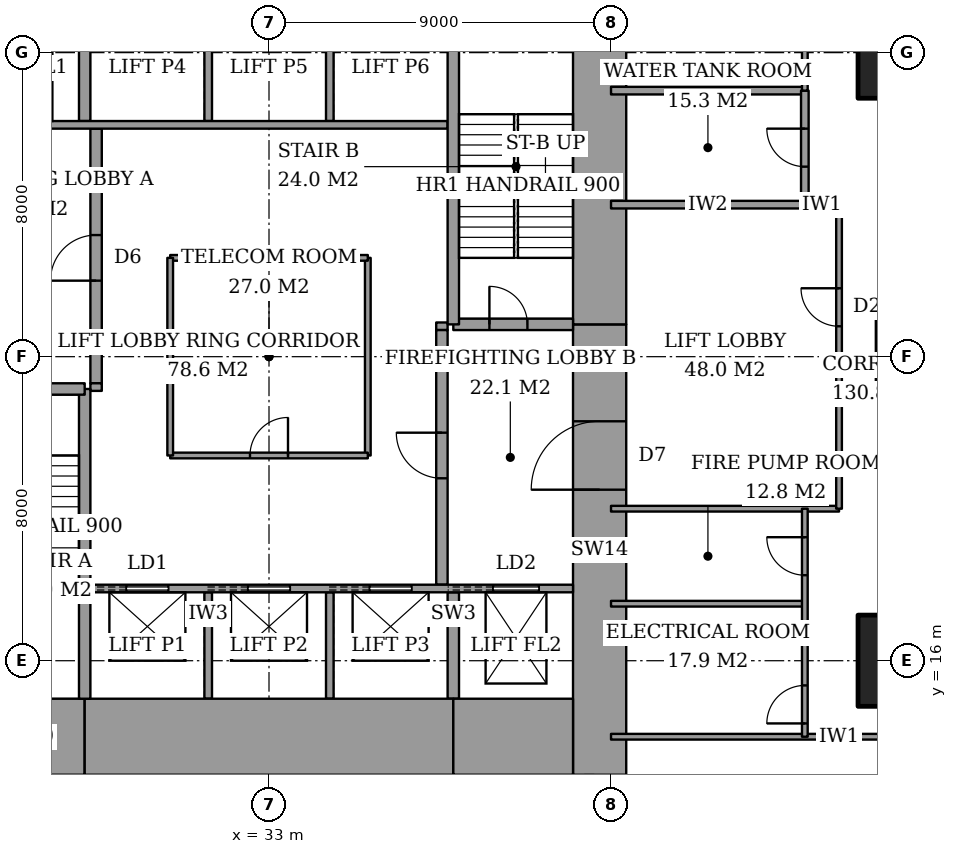
"""IFC4 building model, lengths in metres.
Left out: names, types, materials, properties, quantities, classifications, styles, units other than length and angle.
Written with IfcOpenShell. Run it as: python <this file> out.ifc"""

import sys

from ifc_helpers import new_model, si_unit, direction, frame, frame_2d, origin, origin_2d, place, context, subcontext, project, spatial, rectangle, extrude, element, fill, save


model = new_model("IFC4")
c1 = context("Model", 3, precision=1e-05, world=origin(), true_north=direction((0.0, 1.0)))
c2 = subcontext(c1, "Body", "Model", "MODEL_VIEW")
j1 = project(units=[si_unit("LENGTHUNIT", "METRE"), si_unit("PLANEANGLEUNIT", "RADIAN")], contexts=[c1])
p1 = place(None, origin())
s1 = spatial("IfcSite", under=j1, at=p1, CompositionType="ELEMENT")
p2 = place(p1, origin())
s2 = spatial("IfcBuilding", under=s1, at=p2, CompositionType="ELEMENT")
p3 = place(p2, frame((0.0, 0.0, 90.8)))
s3 = spatial("IfcBuildingStorey", under=s2, at=p3, CompositionType="ELEMENT", Elevation=90.8)
for number, where, z_axis, x_axis in (
    (1, (50.0, 16.0, 0.0), (0.0, 0.0, 1.0), (1.0, 0.0, 0.0)),
    (2, (50.0, 32.0, 0.0), (0.0, 0.0, 1.0), (1.0, 0.0, 0.0)),
):
    element("IfcColumn", number, at=place(p3, frame(where, z_axis=z_axis, x_axis=x_axis)), inside=s3, PredefinedType="COLUMN", context=c2, shape_type="SweptSolid", body=[
        extrude(rectangle(XDim=3.0, YDim=2.4, at=origin_2d()), origin(), (0.0, 0.0, 1.0), 5.4),
    ])
p4 = place(p3, frame((25.0, 14.0, 0.0), z_axis=(0.0, 0.0, 1.0), x_axis=(1.0, 0.0, 0.0)))
e3 = element("IfcWall", 3, at=p4, inside=s3, PredefinedType="SHEAR", context=c2, shape_type="SweptSolid", body=[
    extrude(rectangle(XDim=3.15, YDim=2.0, at=frame_2d((1.575, 0.0))), origin(), (0.0, 0.0, 1.0), 5.4),
])
p5 = place(p3, frame((28.15, 14.0, 0.0), z_axis=(0.0, 0.0, 1.0), x_axis=(1.0, 0.0, 0.0)))
e4 = element("IfcWall", 4, at=p5, inside=s3, PredefinedType="SHEAR", context=c2, shape_type="SweptSolid", body=[
    extrude(rectangle(XDim=9.7, YDim=2.0, at=frame_2d((4.85, 0.0))), origin(), (0.0, 0.0, 1.0), 5.4),
])
p6 = place(p3, frame((37.85, 14.0, 0.0), z_axis=(0.0, 0.0, 1.0), x_axis=(1.0, 0.0, 0.0)))
e5 = element("IfcWall", 5, at=p6, inside=s3, PredefinedType="SHEAR", context=c2, shape_type="SweptSolid", body=[
    extrude(rectangle(XDim=3.15, YDim=2.0, at=frame_2d((1.575, 0.0))), origin(), (0.0, 0.0, 1.0), 5.4),
])
p7 = place(p3, frame((41.7, 13.0, 0.0), z_axis=(0.0, 0.0, 1.0), x_axis=(0.0, 1.0, 0.0)))
e6 = element("IfcWall", 6, at=p7, inside=s3, PredefinedType="SHEAR", context=c2, shape_type="SweptSolid", body=[
    extrude(rectangle(XDim=11.85, YDim=1.4, at=frame_2d((5.925, 0.0))), origin(), (0.0, 0.0, 1.0), 5.4),
])
p8 = place(p7, frame((7.5, 0.0, 0.0)))
e7 = element("IfcOpeningElement", 7, at=p8, cuts=e6, PredefinedType="OPENING", context=c2, shape_type="SweptSolid", body=[
    extrude(rectangle(XDim=1.8, YDim=2.4, at=frame_2d((0.9, 1.2))), frame((0.0, 0.71, 0.0), z_axis=(0.0, -1.0, 0.0), x_axis=(1.0, 0.0, 0.0)), (0.0, 0.0, 1.0), 1.42),
])
p9 = place(p3, frame((41.7, 24.85, 0.0), z_axis=(0.0, 0.0, 1.0), x_axis=(0.0, 1.0, 0.0)))
e8 = element("IfcWall", 8, at=p9, inside=s3, PredefinedType="SHEAR", context=c2, shape_type="SweptSolid", body=[
    extrude(rectangle(XDim=10.15, YDim=1.4, at=frame_2d((5.075, 0.0))), origin(), (0.0, 0.0, 1.0), 5.4),
])
p10 = place(p3, frame((28.15, 15.0, 0.0), z_axis=(0.0, 0.0, 1.0), x_axis=(0.0, 1.0, 0.0)))
e9 = element("IfcWall", 9, at=p10, inside=s3, PredefinedType="SHEAR", context=c2, shape_type="SweptSolid", body=[
    extrude(rectangle(XDim=8.15, YDim=0.3, at=frame_2d((4.075, 0.0))), origin(), (0.0, 0.0, 1.0), 5.4),
])
p11 = place(p3, frame((25.0, 23.15, 0.0), z_axis=(0.0, 0.0, 1.0), x_axis=(1.0, 0.0, 0.0)))
e10 = element("IfcWall", 10, at=p11, inside=s3, PredefinedType="SHEAR", context=c2, shape_type="SweptSolid", body=[
    extrude(rectangle(XDim=3.15, YDim=0.3, at=frame_2d((1.575, 0.0))), origin(), (0.0, 0.0, 1.0), 5.4),
])
p12 = place(p11, frame((0.6, 0.0, 0.0)))
e11 = element("IfcOpeningElement", 11, at=p12, cuts=e10, PredefinedType="OPENING", context=c2, shape_type="SweptSolid", body=[
    extrude(rectangle(XDim=1.0, YDim=2.1, at=frame_2d((0.5, 1.05))), frame((0.0, 0.16, 0.0), z_axis=(0.0, -1.0, 0.0), x_axis=(1.0, 0.0, 0.0)), (0.0, 0.0, 1.0), 0.32),
])
p13 = place(p3, frame((37.85, 24.85, 0.0), z_axis=(0.0, 0.0, 1.0), x_axis=(0.0, 1.0, 0.0)))
e12 = element("IfcWall", 12, at=p13, inside=s3, PredefinedType="SHEAR", context=c2, shape_type="SweptSolid", body=[
    extrude(rectangle(XDim=8.15, YDim=0.3, at=frame_2d((4.075, 0.0))), origin(), (0.0, 0.0, 1.0), 5.4),
])
p14 = place(p3, frame((37.85, 24.85, 0.0), z_axis=(0.0, 0.0, 1.0), x_axis=(1.0, 0.0, 0.0)))
e13 = element("IfcWall", 13, at=p14, inside=s3, PredefinedType="SHEAR", context=c2, shape_type="SweptSolid", body=[
    extrude(rectangle(XDim=3.15, YDim=0.3, at=frame_2d((1.575, 0.0))), origin(), (0.0, 0.0, 1.0), 5.4),
])
p15 = place(p14, frame((0.95, 0.0, 0.0)))
e14 = element("IfcOpeningElement", 14, at=p15, cuts=e13, PredefinedType="OPENING", context=c2, shape_type="SweptSolid", body=[
    extrude(rectangle(XDim=1.0, YDim=2.1, at=frame_2d((0.5, 1.05))), frame((0.0, 0.16, 0.0), z_axis=(0.0, -1.0, 0.0), x_axis=(1.0, 0.0, 0.0)), (0.0, 0.0, 1.0), 0.32),
])
p16 = place(p3, frame((28.45, 23.3, 0.0), z_axis=(0.0, 0.0, 1.0), x_axis=(0.0, 1.0, 0.0)))
e15 = element("IfcWall", 15, at=p16, inside=s3, PredefinedType="PARTITIONING", context=c2, shape_type="SweptSolid", body=[
    extrude(rectangle(XDim=6.7, YDim=0.3, at=frame_2d((3.35, 0.0))), origin(), (0.0, 0.0, 1.0), 5.4),
])
p17 = place(p16, frame((2.7, 0.0, 0.0)))
e16 = element("IfcOpeningElement", 16, at=p17, cuts=e15, PredefinedType="OPENING", context=c2, shape_type="SweptSolid", body=[
    extrude(rectangle(XDim=1.2, YDim=2.1, at=frame_2d((0.6, 1.05))), frame((0.0, 0.16, 0.0), z_axis=(0.0, -1.0, 0.0), x_axis=(1.0, 0.0, 0.0)), (0.0, 0.0, 1.0), 0.32),
])
p18 = place(p3, frame((37.55, 18.0, 0.0), z_axis=(0.0, 0.0, 1.0), x_axis=(0.0, 1.0, 0.0)))
e17 = element("IfcWall", 17, at=p18, inside=s3, PredefinedType="PARTITIONING", context=c2, shape_type="SweptSolid", body=[
    extrude(rectangle(XDim=6.7, YDim=0.3, at=frame_2d((3.35, 0.0))), origin(), (0.0, 0.0, 1.0), 5.4),
])
p19 = place(p18, frame((2.8, 0.0, 0.0)))
e18 = element("IfcOpeningElement", 18, at=p19, cuts=e17, PredefinedType="OPENING", context=c2, shape_type="SweptSolid", body=[
    extrude(rectangle(XDim=1.2, YDim=2.1, at=frame_2d((0.6, 1.05))), frame((0.0, 0.16, 0.0), z_axis=(0.0, -1.0, 0.0), x_axis=(1.0, 0.0, 0.0)), (0.0, 0.0, 1.0), 0.32),
])
p20 = place(p3, frame((42.0, 14.0, 0.0), z_axis=(0.0, 0.0, 1.0), x_axis=(1.0, 0.0, 0.0)))
e19 = element("IfcWall", 19, at=p20, inside=s3, PredefinedType="PARTITIONING", context=c2, shape_type="SweptSolid", body=[
    extrude(rectangle(XDim=12.0, YDim=0.15, at=frame_2d((6.0, 0.0))), origin(), (0.0, 0.0, 1.0), 5.15),
])
p21 = place(p20, frame((9.55, 0.0, 0.0)))
e20 = element("IfcOpeningElement", 20, at=p21, cuts=e19, PredefinedType="OPENING", context=c2, shape_type="SweptSolid", body=[
    extrude(rectangle(XDim=1.0, YDim=2.1, at=frame_2d((0.5, 1.05))), frame((0.0, 0.085, 0.0), z_axis=(0.0, -1.0, 0.0), x_axis=(1.0, 0.0, 0.0)), (0.0, 0.0, 1.0), 0.17),
])
p22 = place(p3, frame((42.0, 17.5, 0.0), z_axis=(0.0, 0.0, 1.0), x_axis=(1.0, 0.0, 0.0)))
e21 = element("IfcWall", 21, at=p22, inside=s3, PredefinedType="PARTITIONING", context=c2, shape_type="SweptSolid", body=[
    extrude(rectangle(XDim=5.1, YDim=0.15, at=frame_2d((2.55, 0.0))), origin(), (0.0, 0.0, 1.0), 5.15),
])
p23 = place(p3, frame((42.0, 20.0, 0.0), z_axis=(0.0, 0.0, 1.0), x_axis=(1.0, 0.0, 0.0)))
e22 = element("IfcWall", 22, at=p23, inside=s3, PredefinedType="PARTITIONING", context=c2, shape_type="SweptSolid", body=[
    extrude(rectangle(XDim=6.0, YDim=0.15, at=frame_2d((3.0, 0.0))), origin(), (0.0, 0.0, 1.0), 5.15),
])
p24 = place(p3, frame((42.0, 28.0, 0.0), z_axis=(0.0, 0.0, 1.0), x_axis=(1.0, 0.0, 0.0)))
e23 = element("IfcWall", 23, at=p24, inside=s3, PredefinedType="PARTITIONING", context=c2, shape_type="SweptSolid", body=[
    extrude(rectangle(XDim=5.1, YDim=0.2, at=frame_2d((2.55, 0.0))), origin(), (0.0, 0.0, 1.0), 5.15),
])
p25 = place(p3, frame((47.1, 28.0, 0.0), z_axis=(0.0, 0.0, 1.0), x_axis=(1.0, 0.0, 0.0)))
e24 = element("IfcWall", 24, at=p25, inside=s3, PredefinedType="PARTITIONING", context=c2, shape_type="SweptSolid", body=[
    extrude(rectangle(XDim=0.9, YDim=0.15, at=frame_2d((0.45, 0.0))), origin(), (0.0, 0.0, 1.0), 5.15),
])
p26 = place(p3, frame((42.0, 31.0, 0.0), z_axis=(0.0, 0.0, 1.0), x_axis=(1.0, 0.0, 0.0)))
e25 = element("IfcWall", 25, at=p26, inside=s3, PredefinedType="PARTITIONING", context=c2, shape_type="SweptSolid", body=[
    extrude(rectangle(XDim=5.1, YDim=0.2, at=frame_2d((2.55, 0.0))), origin(), (0.0, 0.0, 1.0), 5.15),
])
p27 = place(p3, frame((47.1, 28.0, 0.0), z_axis=(0.0, 0.0, 1.0), x_axis=(0.0, 1.0, 0.0)))
e26 = element("IfcWall", 26, at=p27, inside=s3, PredefinedType="PARTITIONING", context=c2, shape_type="SweptSolid", body=[
    extrude(rectangle(XDim=3.0, YDim=0.2, at=frame_2d((1.5, 0.0))), origin(), (0.0, 0.0, 1.0), 5.15),
])
p28 = place(p27, frame((1.0, 0.0, 0.0)))
e27 = element("IfcOpeningElement", 27, at=p28, cuts=e26, PredefinedType="OPENING", context=c2, shape_type="SweptSolid", body=[
    extrude(rectangle(XDim=1.0, YDim=2.1, at=frame_2d((0.5, 1.05))), frame((0.0, 0.11, 0.0), z_axis=(0.0, -1.0, 0.0), x_axis=(1.0, 0.0, 0.0)), (0.0, 0.0, 1.0), 0.22),
])
p29 = place(p3, frame((47.1, 14.0, 0.0), z_axis=(0.0, 0.0, 1.0), x_axis=(0.0, 1.0, 0.0)))
e28 = element("IfcWall", 28, at=p29, inside=s3, PredefinedType="PARTITIONING", context=c2, shape_type="SweptSolid", body=[
    extrude(rectangle(XDim=6.0, YDim=0.15, at=frame_2d((3.0, 0.0))), origin(), (0.0, 0.0, 1.0), 5.15),
])
p30 = place(p29, frame((0.35, 0.0, 0.0)))
e29 = element("IfcOpeningElement", 29, at=p30, cuts=e28, PredefinedType="OPENING", context=c2, shape_type="SweptSolid", body=[
    extrude(rectangle(XDim=1.0, YDim=2.1, at=frame_2d((0.5, 1.05))), frame((0.0, 0.085, 0.0), z_axis=(0.0, -1.0, 0.0), x_axis=(1.0, 0.0, 0.0)), (0.0, 0.0, 1.0), 0.17),
])
p31 = place(p29, frame((4.25, 0.0, 0.0)))
e30 = element("IfcOpeningElement", 30, at=p31, cuts=e28, PredefinedType="OPENING", context=c2, shape_type="SweptSolid", body=[
    extrude(rectangle(XDim=1.0, YDim=2.1, at=frame_2d((0.5, 1.05))), frame((0.0, 0.085, 0.0), z_axis=(0.0, -1.0, 0.0), x_axis=(1.0, 0.0, 0.0)), (0.0, 0.0, 1.0), 0.17),
])
p32 = place(p3, frame((47.1, 31.0, 0.0), z_axis=(0.0, 0.0, 1.0), x_axis=(0.0, 1.0, 0.0)))
e31 = element("IfcWall", 31, at=p32, inside=s3, PredefinedType="PARTITIONING", context=c2, shape_type="SweptSolid", body=[
    extrude(rectangle(XDim=3.0, YDim=0.15, at=frame_2d((1.5, 0.0))), origin(), (0.0, 0.0, 1.0), 5.15),
])
p33 = place(p32, frame((1.7, 0.0, 0.0)))
e32 = element("IfcOpeningElement", 32, at=p33, cuts=e31, PredefinedType="OPENING", context=c2, shape_type="SweptSolid", body=[
    extrude(rectangle(XDim=1.0, YDim=2.1, at=frame_2d((0.5, 1.05))), frame((0.0, 0.085, 0.0), z_axis=(0.0, -1.0, 0.0), x_axis=(1.0, 0.0, 0.0)), (0.0, 0.0, 1.0), 0.17),
])
p34 = place(p3, frame((48.0, 20.0, 0.0), z_axis=(0.0, 0.0, 1.0), x_axis=(0.0, 1.0, 0.0)))
e33 = element("IfcWall", 33, at=p34, inside=s3, PredefinedType="PARTITIONING", context=c2, shape_type="SweptSolid", body=[
    extrude(rectangle(XDim=8.0, YDim=0.15, at=frame_2d((4.0, 0.0))), origin(), (0.0, 0.0, 1.0), 5.15),
])
p35 = place(p34, frame((4.8, 0.0, 0.0)))
e34 = element("IfcOpeningElement", 34, at=p35, cuts=e33, PredefinedType="OPENING", context=c2, shape_type="SweptSolid", body=[
    extrude(rectangle(XDim=1.0, YDim=2.1, at=frame_2d((0.5, 1.05))), frame((0.0, 0.085, 0.0), z_axis=(0.0, -1.0, 0.0), x_axis=(1.0, 0.0, 0.0)), (0.0, 0.0, 1.0), 0.17),
])
p36 = place(p3, frame((28.3, 17.9, 0.0), z_axis=(0.0, 0.0, 1.0), x_axis=(1.0, 0.0, 0.0)))
e35 = element("IfcWall", 35, at=p36, inside=s3, PredefinedType="PARTITIONING", context=c2, shape_type="SweptSolid", body=[
    extrude(rectangle(XDim=12.7, YDim=0.2, at=frame_2d((6.35, 0.0))), origin(), (0.0, 0.0, 1.0), 5.4),
])
p37 = place(p36, frame((0.95, 0.0, 0.0)))
e36 = element("IfcOpeningElement", 36, at=p37, cuts=e35, PredefinedType="OPENING", context=c2, shape_type="SweptSolid", body=[
    extrude(rectangle(XDim=1.1, YDim=2.1, at=frame_2d((0.55, 1.05))), frame((0.0, 0.11, 0.0), z_axis=(0.0, -1.0, 0.0), x_axis=(1.0, 0.0, 0.0)), (0.0, 0.0, 1.0), 0.22),
])
p38 = place(p36, frame((4.15, 0.0, 0.0)))
e37 = element("IfcOpeningElement", 37, at=p38, cuts=e35, PredefinedType="OPENING", context=c2, shape_type="SweptSolid", body=[
    extrude(rectangle(XDim=1.1, YDim=2.1, at=frame_2d((0.55, 1.05))), frame((0.0, 0.11, 0.0), z_axis=(0.0, -1.0, 0.0), x_axis=(1.0, 0.0, 0.0)), (0.0, 0.0, 1.0), 0.22),
])
p39 = place(p36, frame((7.35, 0.0, 0.0)))
e38 = element("IfcOpeningElement", 38, at=p39, cuts=e35, PredefinedType="OPENING", context=c2, shape_type="SweptSolid", body=[
    extrude(rectangle(XDim=1.1, YDim=2.1, at=frame_2d((0.55, 1.05))), frame((0.0, 0.11, 0.0), z_axis=(0.0, -1.0, 0.0), x_axis=(1.0, 0.0, 0.0)), (0.0, 0.0, 1.0), 0.22),
])
p40 = place(p36, frame((10.6, 0.0, 0.0)))
e39 = element("IfcOpeningElement", 39, at=p40, cuts=e35, PredefinedType="OPENING", context=c2, shape_type="SweptSolid", body=[
    extrude(rectangle(XDim=1.2, YDim=2.1, at=frame_2d((0.6, 1.05))), frame((0.0, 0.11, 0.0), z_axis=(0.0, -1.0, 0.0), x_axis=(1.0, 0.0, 0.0)), (0.0, 0.0, 1.0), 0.22),
])
p41 = place(p3, frame((25.0, 30.1, 0.0), z_axis=(0.0, 0.0, 1.0), x_axis=(1.0, 0.0, 0.0)))
e40 = element("IfcWall", 40, at=p41, inside=s3, PredefinedType="PARTITIONING", context=c2, shape_type="SweptSolid", body=[
    extrude(rectangle(XDim=12.7, YDim=0.2, at=frame_2d((6.35, 0.0))), origin(), (0.0, 0.0, 1.0), 5.4),
])
p42 = place(p41, frame((0.9, 0.0, 0.0)))
e41 = element("IfcOpeningElement", 41, at=p42, cuts=e40, PredefinedType="OPENING", context=c2, shape_type="SweptSolid", body=[
    extrude(rectangle(XDim=1.2, YDim=2.1, at=frame_2d((0.6, 1.05))), frame((0.0, 0.11, 0.0), z_axis=(0.0, -1.0, 0.0), x_axis=(1.0, 0.0, 0.0)), (0.0, 0.0, 1.0), 0.22),
])
for number, where, z_axis, x_axis in (
    (42, (31.4, 15.0, 0.0), (0.0, 0.0, 1.0), (0.0, 1.0, 0.0)),
    (43, (34.6, 15.0, 0.0), (0.0, 0.0, 1.0), (0.0, 1.0, 0.0)),
):
    element("IfcWall", number, at=place(p3, frame(where, z_axis=z_axis, x_axis=x_axis)), inside=s3, PredefinedType="PARTITIONING", context=c2, shape_type="SweptSolid", body=[
        extrude(rectangle(XDim=2.8, YDim=0.2, at=frame_2d((1.4, 0.0))), origin(), (0.0, 0.0, 1.0), 5.4),
    ])
p43 = place(p3, frame((37.85, 15.0, 0.0), z_axis=(0.0, 0.0, 1.0), x_axis=(0.0, 1.0, 0.0)))
e44 = element("IfcWall", 44, at=p43, inside=s3, PredefinedType="SHEAR", context=c2, shape_type="SweptSolid", body=[
    extrude(rectangle(XDim=2.8, YDim=0.3, at=frame_2d((1.4, 0.0))), origin(), (0.0, 0.0, 1.0), 5.4),
])
for number, where, z_axis, x_axis in (
    (45, (31.4, 30.2, 0.0), (0.0, 0.0, 1.0), (0.0, 1.0, 0.0)),
    (46, (34.6, 30.2, 0.0), (0.0, 0.0, 1.0), (0.0, 1.0, 0.0)),
):
    element("IfcWall", number, at=place(p3, frame(where, z_axis=z_axis, x_axis=x_axis)), inside=s3, PredefinedType="PARTITIONING", context=c2, shape_type="SweptSolid", body=[
        extrude(rectangle(XDim=2.8, YDim=0.2, at=frame_2d((1.4, 0.0))), origin(), (0.0, 0.0, 1.0), 5.4),
    ])
p44 = place(p3, frame((28.15, 30.2, 0.0), z_axis=(0.0, 0.0, 1.0), x_axis=(0.0, 1.0, 0.0)))
e47 = element("IfcWall", 47, at=p44, inside=s3, PredefinedType="SHEAR", context=c2, shape_type="SweptSolid", body=[
    extrude(rectangle(XDim=2.8, YDim=0.3, at=frame_2d((1.4, 0.0))), origin(), (0.0, 0.0, 1.0), 5.4),
])
for number, where, z_axis, x_axis in (
    (48, (28.3, 23.2, 0.0), (0.0, 0.0, 1.0), (1.0, 0.0, 0.0)),
    (49, (37.4, 24.8, 0.0), (0.0, 0.0, 1.0), (1.0, 0.0, 0.0)),
):
    element("IfcWall", number, at=place(p3, frame(where, z_axis=z_axis, x_axis=x_axis)), inside=s3, PredefinedType="PARTITIONING", context=c2, shape_type="SweptSolid", body=[
        extrude(rectangle(XDim=0.3, YDim=0.2, at=frame_2d((0.15, 0.0))), origin(), (0.0, 0.0, 1.0), 5.4),
    ])
p45 = place(p3, frame((30.4, 21.4, 0.0), z_axis=(0.0, 0.0, 1.0), x_axis=(1.0, 0.0, 0.0)))
e50 = element("IfcWall", 50, at=p45, inside=s3, PredefinedType="PARTITIONING", context=c2, shape_type="SweptSolid", body=[
    extrude(rectangle(XDim=5.2, YDim=0.15, at=frame_2d((2.6, 0.0))), origin(), (0.0, 0.0, 1.0), 5.15),
])
p46 = place(p45, frame((2.1, 0.0, 0.0)))
e51 = element("IfcOpeningElement", 51, at=p46, cuts=e50, PredefinedType="OPENING", context=c2, shape_type="SweptSolid", body=[
    extrude(rectangle(XDim=1.0, YDim=2.1, at=frame_2d((0.5, 1.05))), frame((0.0, 0.085, 0.0), z_axis=(0.0, -1.0, 0.0), x_axis=(1.0, 0.0, 0.0)), (0.0, 0.0, 1.0), 0.17),
])
for number, where, z_axis, x_axis in (
    (52, (30.4, 26.6, 0.0), (0.0, 0.0, 1.0), (1.0, 0.0, 0.0)),
    (53, (30.4, 21.4, 0.0), (0.0, 0.0, 1.0), (0.0, 1.0, 0.0)),
    (54, (35.6, 21.4, 0.0), (0.0, 0.0, 1.0), (0.0, 1.0, 0.0)),
):
    element("IfcWall", number, at=place(p3, frame(where, z_axis=z_axis, x_axis=x_axis)), inside=s3, PredefinedType="PARTITIONING", context=c2, shape_type="SweptSolid", body=[
        extrude(rectangle(XDim=5.2, YDim=0.15, at=frame_2d((2.6, 0.0))), origin(), (0.0, 0.0, 1.0), 5.15),
    ])
p47 = place(p35, origin())
e55 = element("IfcDoor", 55, at=p47, inside=s3, OperationType="SINGLE_SWING_LEFT", PredefinedType="DOOR", context=c2, shape_type="SweptSolid", body=[
    extrude(rectangle(XDim=1.0, YDim=2.1, at=frame_2d((0.5, 1.05))), frame((0.0, 0.025, 0.0), z_axis=(0.0, -1.0, 0.0), x_axis=(1.0, 0.0, 0.0)), (0.0, 0.0, 1.0), 0.05),
])
fill(e34, e55)
p48 = place(p30, origin())
e56 = element("IfcDoor", 56, at=p48, inside=s3, OperationType="SINGLE_SWING_RIGHT", PredefinedType="DOOR", context=c2, shape_type="SweptSolid", body=[
    extrude(rectangle(XDim=1.0, YDim=2.1, at=frame_2d((0.5, 1.05))), frame((0.0, 0.025, 0.0), z_axis=(0.0, -1.0, 0.0), x_axis=(1.0, 0.0, 0.0)), (0.0, 0.0, 1.0), 0.05),
])
fill(e29, e56)
p49 = place(p31, origin())
e57 = element("IfcDoor", 57, at=p49, inside=s3, OperationType="SINGLE_SWING_LEFT", PredefinedType="DOOR", context=c2, shape_type="SweptSolid", body=[
    extrude(rectangle(XDim=1.0, YDim=2.1, at=frame_2d((0.5, 1.05))), frame((0.0, 0.025, 0.0), z_axis=(0.0, -1.0, 0.0), x_axis=(1.0, 0.0, 0.0)), (0.0, 0.0, 1.0), 0.05),
])
fill(e30, e57)
p50 = place(p28, origin())
e58 = element("IfcDoor", 58, at=p50, inside=s3, OperationType="SINGLE_SWING_LEFT", PredefinedType="DOOR", context=c2, shape_type="SweptSolid", body=[
    extrude(rectangle(XDim=1.0, YDim=2.1, at=frame_2d((0.5, 1.05))), frame((0.0, 0.025, 0.0), z_axis=(0.0, -1.0, 0.0), x_axis=(1.0, 0.0, 0.0)), (0.0, 0.0, 1.0), 0.05),
])
fill(e27, e58)
p51 = place(p15, origin())
e59 = element("IfcDoor", 59, at=p51, inside=s3, OperationType="SINGLE_SWING_RIGHT", PredefinedType="DOOR", context=c2, shape_type="SweptSolid", body=[
    extrude(rectangle(XDim=1.0, YDim=2.1, at=frame_2d((0.5, 1.05))), frame((0.0, 0.025, 0.0), z_axis=(0.0, -1.0, 0.0), x_axis=(1.0, 0.0, 0.0)), (0.0, 0.0, 1.0), 0.05),
])
fill(e14, e59)
p52 = place(p17, origin())
e60 = element("IfcDoor", 60, at=p52, inside=s3, OperationType="SINGLE_SWING_RIGHT", PredefinedType="DOOR", context=c2, shape_type="SweptSolid", body=[
    extrude(rectangle(XDim=1.2, YDim=2.1, at=frame_2d((0.6, 1.05))), frame((0.0, 0.025, 0.0), z_axis=(0.0, -1.0, 0.0), x_axis=(1.0, 0.0, 0.0)), (0.0, 0.0, 1.0), 0.05),
])
fill(e16, e60)
p53 = place(p19, origin())
e61 = element("IfcDoor", 61, at=p53, inside=s3, OperationType="SINGLE_SWING_LEFT", PredefinedType="DOOR", context=c2, shape_type="SweptSolid", body=[
    extrude(rectangle(XDim=1.2, YDim=2.1, at=frame_2d((0.6, 1.05))), frame((0.0, 0.025, 0.0), z_axis=(0.0, -1.0, 0.0), x_axis=(1.0, 0.0, 0.0)), (0.0, 0.0, 1.0), 0.05),
])
fill(e18, e61)
p54 = place(p8, origin())
e62 = element("IfcDoor", 62, at=p54, inside=s3, OperationType="DOUBLE_DOOR_DOUBLE_SWING", PredefinedType="DOOR", context=c2, shape_type="SweptSolid", body=[
    extrude(rectangle(XDim=1.8, YDim=2.4, at=frame_2d((0.9, 1.2))), frame((0.0, 0.025, 0.0), z_axis=(0.0, -1.0, 0.0), x_axis=(1.0, 0.0, 0.0)), (0.0, 0.0, 1.0), 0.05),
])
fill(e7, e62)
p55 = place(p46, origin())
e63 = element("IfcDoor", 63, at=p55, inside=s3, OperationType="SINGLE_SWING_LEFT", PredefinedType="DOOR", context=c2, shape_type="SweptSolid", body=[
    extrude(rectangle(XDim=1.0, YDim=2.1, at=frame_2d((0.5, 1.05))), frame((0.0, 0.025, 0.0), z_axis=(0.0, -1.0, 0.0), x_axis=(1.0, 0.0, 0.0)), (0.0, 0.0, 1.0), 0.05),
])
fill(e51, e63)
p56 = place(p37, origin())
e64 = element("IfcDoor", 64, at=p56, inside=s3, OperationType="SLIDING_TO_LEFT", PredefinedType="DOOR", context=c2, shape_type="SweptSolid", body=[
    extrude(rectangle(XDim=1.1, YDim=2.1, at=frame_2d((0.55, 1.05))), frame((0.0, 0.025, 0.0), z_axis=(0.0, -1.0, 0.0), x_axis=(1.0, 0.0, 0.0)), (0.0, 0.0, 1.0), 0.05),
])
fill(e36, e64)
p57 = place(p38, origin())
e65 = element("IfcDoor", 65, at=p57, inside=s3, OperationType="SLIDING_TO_LEFT", PredefinedType="DOOR", context=c2, shape_type="SweptSolid", body=[
    extrude(rectangle(XDim=1.1, YDim=2.1, at=frame_2d((0.55, 1.05))), frame((0.0, 0.025, 0.0), z_axis=(0.0, -1.0, 0.0), x_axis=(1.0, 0.0, 0.0)), (0.0, 0.0, 1.0), 0.05),
])
fill(e37, e65)
p58 = place(p39, origin())
e66 = element("IfcDoor", 66, at=p58, inside=s3, OperationType="SLIDING_TO_LEFT", PredefinedType="DOOR", context=c2, shape_type="SweptSolid", body=[
    extrude(rectangle(XDim=1.1, YDim=2.1, at=frame_2d((0.55, 1.05))), frame((0.0, 0.025, 0.0), z_axis=(0.0, -1.0, 0.0), x_axis=(1.0, 0.0, 0.0)), (0.0, 0.0, 1.0), 0.05),
])
fill(e38, e66)
p59 = place(p40, origin())
e67 = element("IfcDoor", 67, at=p59, inside=s3, OperationType="SLIDING_TO_LEFT", PredefinedType="DOOR", context=c2, shape_type="SweptSolid", body=[
    extrude(rectangle(XDim=1.2, YDim=2.1, at=frame_2d((0.6, 1.05))), frame((0.0, 0.025, 0.0), z_axis=(0.0, -1.0, 0.0), x_axis=(1.0, 0.0, 0.0)), (0.0, 0.0, 1.0), 0.05),
])
fill(e39, e67)
save(model, sys.argv[1])
